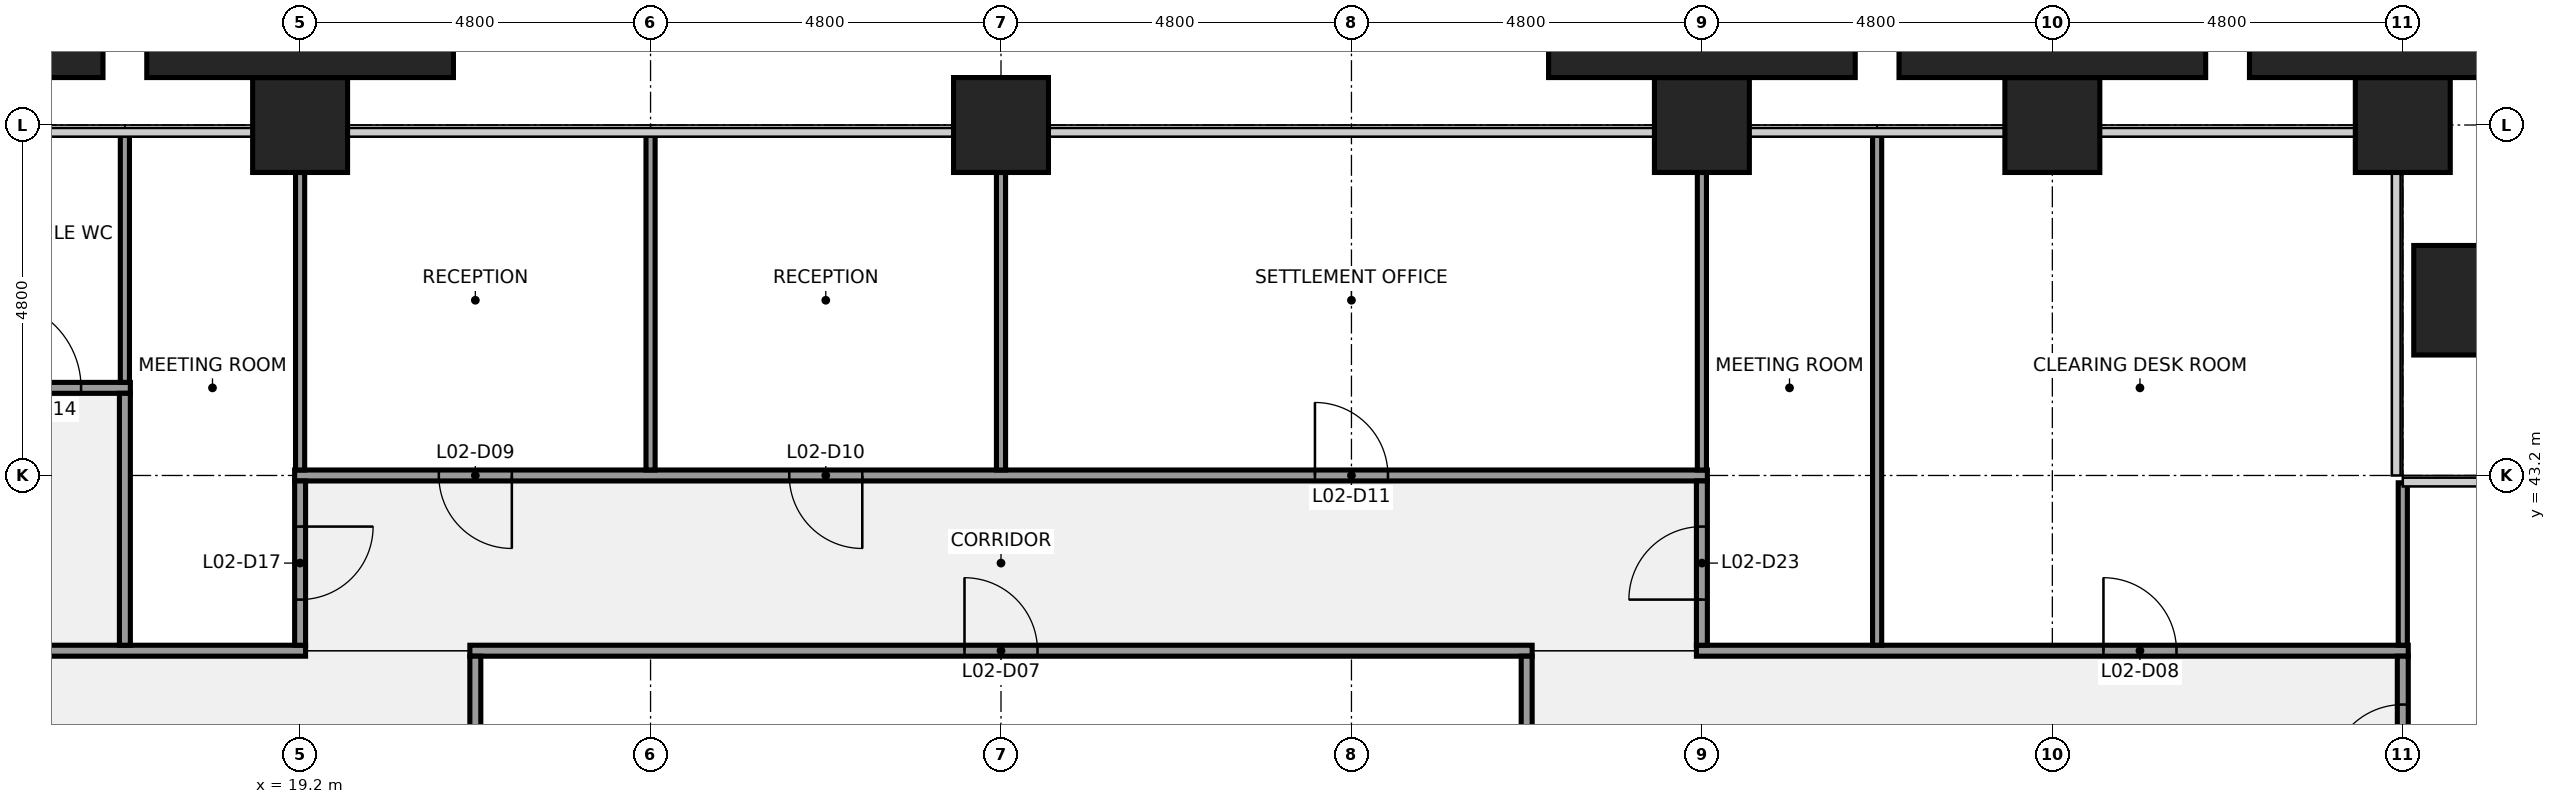
"""IFC4 building model, lengths in metres.
Left out: names, types, materials, properties, quantities, classifications, styles, units other than length and angle.
Written with IfcOpenShell. Run it as: python <this file> out.ifc"""

import sys

from ifc_helpers import new_model, si_unit, direction, frame, frame_2d, origin, origin_2d, place, context, subcontext, project, spatial, rectangle, extrude, element, fill, save


model = new_model("IFC4")
c1 = context("Model", 3, precision=1e-05, world=origin(), true_north=direction((0.0, 1.0)))
c2 = subcontext(c1, "Body", "Model", "MODEL_VIEW")
j1 = project(units=[si_unit("LENGTHUNIT", "METRE"), si_unit("PLANEANGLEUNIT", "RADIAN")], contexts=[c1])
p1 = place(None, origin())
s1 = spatial("IfcSite", under=j1, at=p1, CompositionType="ELEMENT")
p2 = place(p1, origin())
s2 = spatial("IfcBuilding", under=s1, at=p2, CompositionType="ELEMENT")
p3 = place(p2, frame((0.0, 0.0, 17.0)))
s3 = spatial("IfcBuildingStorey", under=s2, at=p3, CompositionType="ELEMENT", Elevation=17.0)
for number, where, z_axis, x_axis in (
    (1, (19.2, 48.0, 0.0), (0.0, 0.0, 1.0), (1.0, 0.0, 0.0)),
    (2, (28.8, 48.0, 0.0), (0.0, 0.0, 1.0), (1.0, 0.0, 0.0)),
    (3, (38.4, 48.0, 0.0), (0.0, 0.0, 1.0), (1.0, 0.0, 0.0)),
    (4, (43.2, 48.0, 0.0), (0.0, 0.0, 1.0), (1.0, 0.0, 0.0)),
    (5, (48.0, 48.0, 0.0), (0.0, 0.0, 1.0), (1.0, 0.0, 0.0)),
):
    element("IfcColumn", number, at=place(p3, frame(where, z_axis=z_axis, x_axis=x_axis)), inside=s3, PredefinedType="COLUMN", context=c2, shape_type="SweptSolid", body=[
        extrude(rectangle(XDim=1.3, YDim=1.3, at=origin_2d()), origin(), (0.0, 0.0, 1.0), 4.4),
    ])
p4 = place(p3, frame((9.525, 40.8, 0.0), z_axis=(0.0, 0.0, 1.0), x_axis=(1.0, 0.0, 0.0)))
e6 = element("IfcWall", 6, at=p4, inside=s3, PredefinedType="PARTITIONING", context=c2, shape_type="SweptSolid", body=[
    extrude(rectangle(XDim=9.75, YDim=0.15, at=frame_2d((4.875, 0.0))), origin(), (0.0, 0.0, 1.0), 3.25),
])
p5 = place(p4, frame((3.175, 0.0, 0.0)))
e7 = element("IfcOpeningElement", 7, at=p5, cuts=e6, PredefinedType="OPENING", context=c2, shape_type="SweptSolid", body=[
    extrude(rectangle(XDim=1.0, YDim=2.1, at=frame_2d((0.5, 1.05))), frame((0.0, 0.085, 0.0), z_axis=(0.0, -1.0, 0.0), x_axis=(1.0, 0.0, 0.0)), (0.0, 0.0, 1.0), 0.17),
])
p6 = place(p3, frame((21.525, 40.8, 0.0), z_axis=(0.0, 0.0, 1.0), x_axis=(1.0, 0.0, 0.0)))
e8 = element("IfcWall", 8, at=p6, inside=s3, PredefinedType="PARTITIONING", context=c2, shape_type="SweptSolid", body=[
    extrude(rectangle(XDim=14.55, YDim=0.15, at=frame_2d((7.275, 0.0))), origin(), (0.0, 0.0, 1.0), 3.25),
])
p7 = place(p6, frame((6.775, 0.0, 0.0)))
e9 = element("IfcOpeningElement", 9, at=p7, cuts=e8, PredefinedType="OPENING", context=c2, shape_type="SweptSolid", body=[
    extrude(rectangle(XDim=1.0, YDim=2.1, at=frame_2d((0.5, 1.05))), frame((0.0, 0.085, 0.0), z_axis=(0.0, -1.0, 0.0), x_axis=(1.0, 0.0, 0.0)), (0.0, 0.0, 1.0), 0.17),
])
p8 = place(p3, frame((38.325, 40.8, 0.0), z_axis=(0.0, 0.0, 1.0), x_axis=(1.0, 0.0, 0.0)))
e10 = element("IfcWall", 10, at=p8, inside=s3, PredefinedType="PARTITIONING", context=c2, shape_type="SweptSolid", body=[
    extrude(rectangle(XDim=9.75, YDim=0.15, at=frame_2d((4.875, 0.0))), origin(), (0.0, 0.0, 1.0), 3.25),
])
p9 = place(p8, frame((5.575, 0.0, 0.0)))
e11 = element("IfcOpeningElement", 11, at=p9, cuts=e10, PredefinedType="OPENING", context=c2, shape_type="SweptSolid", body=[
    extrude(rectangle(XDim=1.0, YDim=2.1, at=frame_2d((0.5, 1.05))), frame((0.0, 0.085, 0.0), z_axis=(0.0, -1.0, 0.0), x_axis=(1.0, 0.0, 0.0)), (0.0, 0.0, 1.0), 0.17),
])
p10 = place(p3, frame((19.125, 43.2, 0.0), z_axis=(0.0, 0.0, 1.0), x_axis=(1.0, 0.0, 0.0)))
e12 = element("IfcWall", 12, at=p10, inside=s3, PredefinedType="PARTITIONING", context=c2, shape_type="SweptSolid", body=[
    extrude(rectangle(XDim=19.35, YDim=0.15, at=frame_2d((9.675, 0.0))), origin(), (0.0, 0.0, 1.0), 3.25),
])
p11 = place(p10, frame((1.975, 0.0, 0.0)))
e13 = element("IfcOpeningElement", 13, at=p11, cuts=e12, PredefinedType="OPENING", context=c2, shape_type="SweptSolid", body=[
    extrude(rectangle(XDim=1.0, YDim=2.1, at=frame_2d((0.5, 1.05))), frame((0.0, 0.085, 0.0), z_axis=(0.0, -1.0, 0.0), x_axis=(1.0, 0.0, 0.0)), (0.0, 0.0, 1.0), 0.17),
])
p12 = place(p10, frame((6.775, 0.0, 0.0)))
e14 = element("IfcOpeningElement", 14, at=p12, cuts=e12, PredefinedType="OPENING", context=c2, shape_type="SweptSolid", body=[
    extrude(rectangle(XDim=1.0, YDim=2.1, at=frame_2d((0.5, 1.05))), frame((0.0, 0.085, 0.0), z_axis=(0.0, -1.0, 0.0), x_axis=(1.0, 0.0, 0.0)), (0.0, 0.0, 1.0), 0.17),
])
p13 = place(p10, frame((13.975, 0.0, 0.0)))
e15 = element("IfcOpeningElement", 15, at=p13, cuts=e12, PredefinedType="OPENING", context=c2, shape_type="SweptSolid", body=[
    extrude(rectangle(XDim=1.0, YDim=2.1, at=frame_2d((0.5, 1.05))), frame((0.0, 0.085, 0.0), z_axis=(0.0, -1.0, 0.0), x_axis=(1.0, 0.0, 0.0)), (0.0, 0.0, 1.0), 0.17),
])
p14 = place(p3, frame((9.7, 44.4, 0.0), z_axis=(0.0, 0.0, 1.0), x_axis=(1.0, 0.0, 0.0)))
e16 = element("IfcWall", 16, at=p14, inside=s3, PredefinedType="PARTITIONING", context=c2, shape_type="SweptSolid", body=[
    extrude(rectangle(XDim=7.175, YDim=0.15, at=frame_2d((3.587, 0.0))), origin(), (0.0, 0.0, 1.0), 3.25),
])
p15 = place(p14, frame((0.7, 0.0, 0.0)))
e17 = element("IfcOpeningElement", 17, at=p15, cuts=e16, PredefinedType="OPENING", context=c2, shape_type="SweptSolid", body=[
    extrude(rectangle(XDim=0.9, YDim=2.1, at=frame_2d((0.45, 1.05))), frame((0.0, 0.085, 0.0), z_axis=(0.0, -1.0, 0.0), x_axis=(1.0, 0.0, 0.0)), (0.0, 0.0, 1.0), 0.17),
])
p16 = place(p14, frame((3.05, 0.0, 0.0)))
e18 = element("IfcOpeningElement", 18, at=p16, cuts=e16, PredefinedType="OPENING", context=c2, shape_type="SweptSolid", body=[
    extrude(rectangle(XDim=0.9, YDim=2.1, at=frame_2d((0.45, 1.05))), frame((0.0, 0.085, 0.0), z_axis=(0.0, -1.0, 0.0), x_axis=(1.0, 0.0, 0.0)), (0.0, 0.0, 1.0), 0.17),
])
p17 = place(p14, frame((5.3, 0.0, 0.0)))
e19 = element("IfcOpeningElement", 19, at=p17, cuts=e16, PredefinedType="OPENING", context=c2, shape_type="SweptSolid", body=[
    extrude(rectangle(XDim=1.2, YDim=2.1, at=frame_2d((0.6, 1.05))), frame((0.0, 0.085, 0.0), z_axis=(0.0, -1.0, 0.0), x_axis=(1.0, 0.0, 0.0)), (0.0, 0.0, 1.0), 0.17),
])
p18 = place(p3, frame((16.8, 44.475, 0.0), z_axis=(0.0, 0.0, 1.0), x_axis=(0.0, 1.0, 0.0)))
e20 = element("IfcWall", 20, at=p18, inside=s3, PredefinedType="PARTITIONING", context=c2, shape_type="SweptSolid", body=[
    extrude(rectangle(XDim=3.425, YDim=0.125, at=frame_2d((1.712, 0.0))), origin(), (0.0, 0.0, 1.0), 3.25),
])
p19 = place(p3, frame((16.8, 40.875, 0.0), z_axis=(0.0, 0.0, 1.0), x_axis=(0.0, 1.0, 0.0)))
e21 = element("IfcWall", 21, at=p19, inside=s3, PredefinedType="PARTITIONING", context=c2, shape_type="SweptSolid", body=[
    extrude(rectangle(XDim=3.45, YDim=0.15, at=frame_2d((1.725, 0.0))), origin(), (0.0, 0.0, 1.0), 3.25),
])
p20 = place(p3, frame((19.2, 43.275, 0.0), z_axis=(0.0, 0.0, 1.0), x_axis=(0.0, 1.0, 0.0)))
e22 = element("IfcWall", 22, at=p20, inside=s3, PredefinedType="PARTITIONING", context=c2, shape_type="SweptSolid", body=[
    extrude(rectangle(XDim=4.075, YDim=0.125, at=frame_2d((2.038, 0.0))), origin(), (0.0, 0.0, 1.0), 3.25),
])
p21 = place(p3, frame((19.2, 40.875, 0.0), z_axis=(0.0, 0.0, 1.0), x_axis=(0.0, 1.0, 0.0)))
e23 = element("IfcWall", 23, at=p21, inside=s3, PredefinedType="PARTITIONING", context=c2, shape_type="SweptSolid", body=[
    extrude(rectangle(XDim=2.25, YDim=0.15, at=frame_2d((1.125, 0.0))), origin(), (0.0, 0.0, 1.0), 3.25),
])
p22 = place(p21, frame((0.625, 0.0, 0.0)))
e24 = element("IfcOpeningElement", 24, at=p22, cuts=e23, PredefinedType="OPENING", context=c2, shape_type="SweptSolid", body=[
    extrude(rectangle(XDim=1.0, YDim=2.1, at=frame_2d((0.5, 1.05))), frame((0.0, 0.085, 0.0), z_axis=(0.0, -1.0, 0.0), x_axis=(1.0, 0.0, 0.0)), (0.0, 0.0, 1.0), 0.17),
])
p23 = place(p3, frame((21.6, 33.663, 0.0), z_axis=(0.0, 0.0, 1.0), x_axis=(0.0, 1.0, 0.0)))
e25 = element("IfcWall", 25, at=p23, inside=s3, PredefinedType="PARTITIONING", context=c2, shape_type="SweptSolid", body=[
    extrude(rectangle(XDim=7.062, YDim=0.15, at=frame_2d((3.531, 0.0))), origin(), (0.0, 0.0, 1.0), 3.25),
])
p24 = place(p3, frame((24.0, 43.275, 0.0), z_axis=(0.0, 0.0, 1.0), x_axis=(0.0, 1.0, 0.0)))
e26 = element("IfcWall", 26, at=p24, inside=s3, PredefinedType="PARTITIONING", context=c2, shape_type="SweptSolid", body=[
    extrude(rectangle(XDim=4.625, YDim=0.125, at=frame_2d((2.312, 0.0))), origin(), (0.0, 0.0, 1.0), 3.25),
])
p25 = place(p3, frame((28.8, 43.275, 0.0), z_axis=(0.0, 0.0, 1.0), x_axis=(0.0, 1.0, 0.0)))
e27 = element("IfcWall", 27, at=p25, inside=s3, PredefinedType="PARTITIONING", context=c2, shape_type="SweptSolid", body=[
    extrude(rectangle(XDim=4.075, YDim=0.125, at=frame_2d((2.038, 0.0))), origin(), (0.0, 0.0, 1.0), 3.25),
])
p26 = place(p3, frame((36.0, 33.663, 0.0), z_axis=(0.0, 0.0, 1.0), x_axis=(0.0, 1.0, 0.0)))
e28 = element("IfcWall", 28, at=p26, inside=s3, PredefinedType="PARTITIONING", context=c2, shape_type="SweptSolid", body=[
    extrude(rectangle(XDim=7.062, YDim=0.15, at=frame_2d((3.531, 0.0))), origin(), (0.0, 0.0, 1.0), 3.25),
])
p27 = place(p3, frame((38.4, 43.275, 0.0), z_axis=(0.0, 0.0, 1.0), x_axis=(0.0, 1.0, 0.0)))
e29 = element("IfcWall", 29, at=p27, inside=s3, PredefinedType="PARTITIONING", context=c2, shape_type="SweptSolid", body=[
    extrude(rectangle(XDim=4.075, YDim=0.125, at=frame_2d((2.038, 0.0))), origin(), (0.0, 0.0, 1.0), 3.25),
])
p28 = place(p3, frame((38.4, 40.875, 0.0), z_axis=(0.0, 0.0, 1.0), x_axis=(0.0, 1.0, 0.0)))
e30 = element("IfcWall", 30, at=p28, inside=s3, PredefinedType="PARTITIONING", context=c2, shape_type="SweptSolid", body=[
    extrude(rectangle(XDim=2.25, YDim=0.15, at=frame_2d((1.125, 0.0))), origin(), (0.0, 0.0, 1.0), 3.25),
])
p29 = place(p28, frame((0.625, 0.0, 0.0)))
e31 = element("IfcOpeningElement", 31, at=p29, cuts=e30, PredefinedType="OPENING", context=c2, shape_type="SweptSolid", body=[
    extrude(rectangle(XDim=1.0, YDim=2.1, at=frame_2d((0.5, 1.05))), frame((0.0, 0.085, 0.0), z_axis=(0.0, -1.0, 0.0), x_axis=(1.0, 0.0, 0.0)), (0.0, 0.0, 1.0), 0.17),
])
p30 = place(p3, frame((40.8, 40.875, 0.0), z_axis=(0.0, 0.0, 1.0), x_axis=(0.0, 1.0, 0.0)))
e32 = element("IfcWall", 32, at=p30, inside=s3, PredefinedType="PARTITIONING", context=c2, shape_type="SweptSolid", body=[
    extrude(rectangle(XDim=7.025, YDim=0.125, at=frame_2d((3.512, 0.0))), origin(), (0.0, 0.0, 1.0), 3.25),
])
p31 = place(p3, frame((48.0, 40.875, 0.0), z_axis=(0.0, 0.0, 1.0), x_axis=(0.0, 1.0, 0.0)))
e33 = element("IfcWall", 33, at=p31, inside=s3, PredefinedType="PARTITIONING", context=c2, shape_type="SweptSolid", body=[
    extrude(rectangle(XDim=2.225, YDim=0.125, at=frame_2d((1.113, 0.0))), origin(), (0.0, 0.0, 1.0), 3.25),
])
p32 = place(p3, frame((48.0, 38.4, 0.0), z_axis=(0.0, 0.0, 1.0), x_axis=(0.0, 1.0, 0.0)))
e34 = element("IfcWall", 34, at=p32, inside=s3, PredefinedType="PARTITIONING", context=c2, shape_type="SweptSolid", body=[
    extrude(rectangle(XDim=2.325, YDim=0.15, at=frame_2d((1.163, 0.0))), origin(), (0.0, 0.0, 1.0), 3.25),
])
p33 = place(p32, frame((0.663, 0.0, 0.0)))
e35 = element("IfcOpeningElement", 35, at=p33, cuts=e34, PredefinedType="OPENING", context=c2, shape_type="SweptSolid", body=[
    extrude(rectangle(XDim=1.0, YDim=2.1, at=frame_2d((0.5, 1.05))), frame((0.0, 0.085, 0.0), z_axis=(0.0, -1.0, 0.0), x_axis=(1.0, 0.0, 0.0)), (0.0, 0.0, 1.0), 0.17),
])
p34 = place(p3, frame((48.75, 45.6, 0.0), z_axis=(0.0, 0.0, 1.0), x_axis=(0.0, 1.0, 0.0)))
e36 = element("IfcColumn", 36, at=p34, inside=s3, PredefinedType="PILASTER", context=c2, shape_type="SweptSolid", body=[
    extrude(rectangle(XDim=1.2, YDim=1.5, at=origin_2d()), origin(), (0.0, 0.0, 1.0), 4.4),
])
for number, where, z_axis, x_axis in (
    (37, (14.4, 49.075, 0.0), (0.0, 0.0, 1.0), (1.0, 0.0, 0.0)),
    (38, (19.2, 49.075, 0.0), (0.0, 0.0, 1.0), (1.0, 0.0, 0.0)),
    (39, (38.4, 49.075, 0.0), (0.0, 0.0, 1.0), (1.0, 0.0, 0.0)),
    (40, (43.2, 49.075, 0.0), (0.0, 0.0, 1.0), (1.0, 0.0, 0.0)),
    (41, (48.0, 49.075, 0.0), (0.0, 0.0, 1.0), (1.0, 0.0, 0.0)),
):
    element("IfcColumn", number, at=place(p3, frame(where, z_axis=z_axis, x_axis=x_axis)), inside=s3, PredefinedType="PILASTER", context=c2, shape_type="SweptSolid", body=[
        extrude(rectangle(XDim=4.2, YDim=0.85, at=origin_2d()), origin(), (0.0, 0.0, 1.0), 4.4),
    ])
p35 = place(p7, origin())
e42 = element("IfcDoor", 42, at=p35, inside=s3, OperationType="SINGLE_SWING_LEFT", PredefinedType="DOOR", context=c2, shape_type="SweptSolid", body=[
    extrude(rectangle(XDim=1.0, YDim=2.1, at=frame_2d((0.5, 1.05))), frame((0.0, 0.025, 0.0), z_axis=(0.0, -1.0, 0.0), x_axis=(1.0, 0.0, 0.0)), (0.0, 0.0, 1.0), 0.05),
])
fill(e9, e42)
p36 = place(p9, origin())
e43 = element("IfcDoor", 43, at=p36, inside=s3, OperationType="SINGLE_SWING_LEFT", PredefinedType="DOOR", context=c2, shape_type="SweptSolid", body=[
    extrude(rectangle(XDim=1.0, YDim=2.1, at=frame_2d((0.5, 1.05))), frame((0.0, 0.025, 0.0), z_axis=(0.0, -1.0, 0.0), x_axis=(1.0, 0.0, 0.0)), (0.0, 0.0, 1.0), 0.05),
])
fill(e11, e43)
p37 = place(p11, origin())
e44 = element("IfcDoor", 44, at=p37, inside=s3, OperationType="SINGLE_SWING_RIGHT", PredefinedType="DOOR", context=c2, shape_type="SweptSolid", body=[
    extrude(rectangle(XDim=1.0, YDim=2.1, at=frame_2d((0.5, 1.05))), frame((0.0, 0.025, 0.0), z_axis=(0.0, -1.0, 0.0), x_axis=(1.0, 0.0, 0.0)), (0.0, 0.0, 1.0), 0.05),
])
fill(e13, e44)
p38 = place(p12, origin())
e45 = element("IfcDoor", 45, at=p38, inside=s3, OperationType="SINGLE_SWING_RIGHT", PredefinedType="DOOR", context=c2, shape_type="SweptSolid", body=[
    extrude(rectangle(XDim=1.0, YDim=2.1, at=frame_2d((0.5, 1.05))), frame((0.0, 0.025, 0.0), z_axis=(0.0, -1.0, 0.0), x_axis=(1.0, 0.0, 0.0)), (0.0, 0.0, 1.0), 0.05),
])
fill(e14, e45)
p39 = place(p13, origin())
e46 = element("IfcDoor", 46, at=p39, inside=s3, OperationType="SINGLE_SWING_LEFT", PredefinedType="DOOR", context=c2, shape_type="SweptSolid", body=[
    extrude(rectangle(XDim=1.0, YDim=2.1, at=frame_2d((0.5, 1.05))), frame((0.0, 0.025, 0.0), z_axis=(0.0, -1.0, 0.0), x_axis=(1.0, 0.0, 0.0)), (0.0, 0.0, 1.0), 0.05),
])
fill(e15, e46)
p40 = place(p17, origin())
e47 = element("IfcDoor", 47, at=p40, inside=s3, OperationType="SINGLE_SWING_LEFT", PredefinedType="DOOR", context=c2, shape_type="SweptSolid", body=[
    extrude(rectangle(XDim=1.2, YDim=2.1, at=frame_2d((0.6, 1.05))), frame((0.0, 0.025, 0.0), z_axis=(0.0, -1.0, 0.0), x_axis=(1.0, 0.0, 0.0)), (0.0, 0.0, 1.0), 0.05),
])
fill(e19, e47)
p41 = place(p22, origin())
e48 = element("IfcDoor", 48, at=p41, inside=s3, OperationType="SINGLE_SWING_RIGHT", PredefinedType="DOOR", context=c2, shape_type="SweptSolid", body=[
    extrude(rectangle(XDim=1.0, YDim=2.1, at=frame_2d((0.5, 1.05))), frame((0.0, 0.025, 0.0), z_axis=(0.0, -1.0, 0.0), x_axis=(1.0, 0.0, 0.0)), (0.0, 0.0, 1.0), 0.05),
])
fill(e24, e48)
p42 = place(p29, origin())
e49 = element("IfcDoor", 49, at=p42, inside=s3, OperationType="SINGLE_SWING_LEFT", PredefinedType="DOOR", context=c2, shape_type="SweptSolid", body=[
    extrude(rectangle(XDim=1.0, YDim=2.1, at=frame_2d((0.5, 1.05))), frame((0.0, 0.025, 0.0), z_axis=(0.0, -1.0, 0.0), x_axis=(1.0, 0.0, 0.0)), (0.0, 0.0, 1.0), 0.05),
])
fill(e31, e49)
p43 = place(p33, origin())
e50 = element("IfcDoor", 50, at=p43, inside=s3, OperationType="SINGLE_SWING_LEFT", PredefinedType="DOOR", context=c2, shape_type="SweptSolid", body=[
    extrude(rectangle(XDim=1.0, YDim=2.1, at=frame_2d((0.5, 1.05))), frame((0.0, 0.025, 0.0), z_axis=(0.0, -1.0, 0.0), x_axis=(1.0, 0.0, 0.0)), (0.0, 0.0, 1.0), 0.05),
])
fill(e35, e50)
save(model, sys.argv[1])
